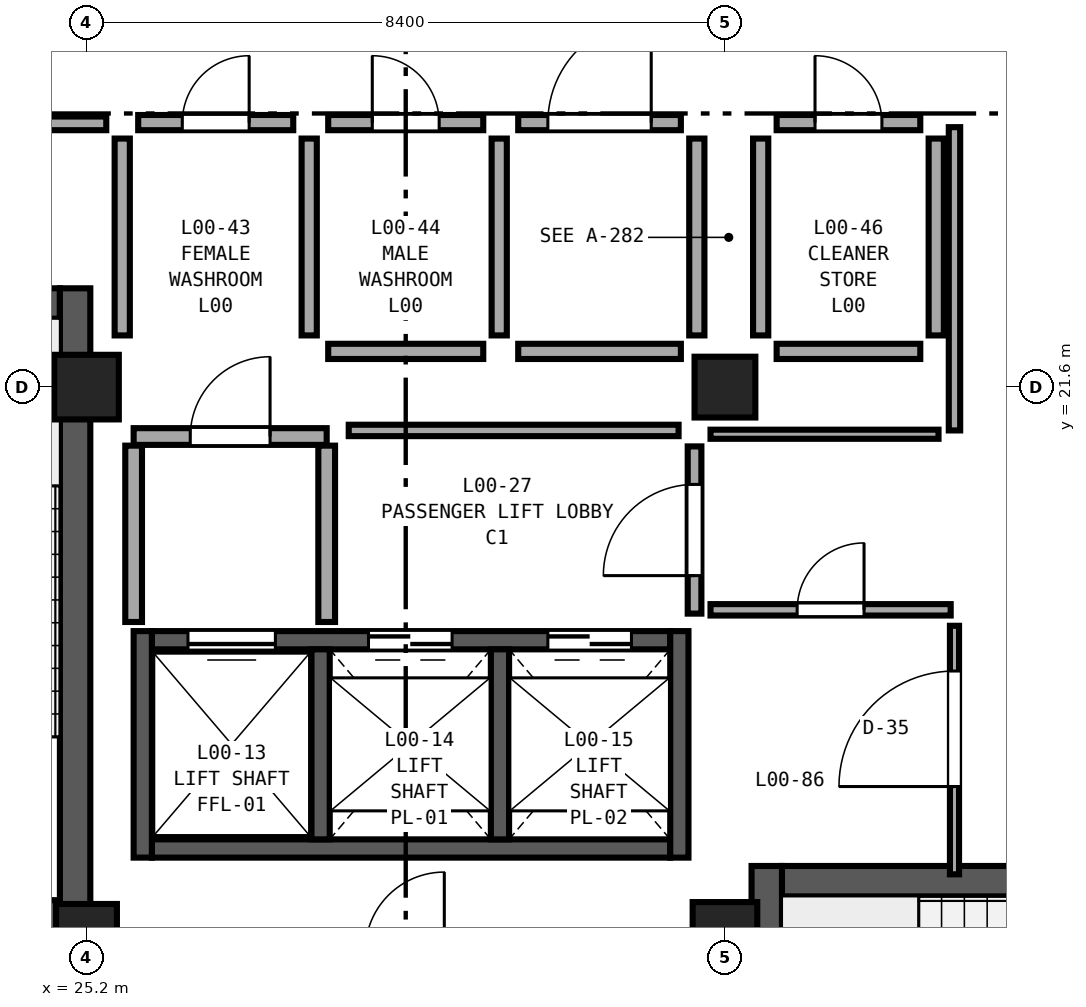
"""IFC4 building model, lengths in metres.
Left out: names, types, materials, properties, quantities, classifications, styles, units other than length and angle.
Written with IfcOpenShell. Run it as: python <this file> out.ifc"""

import sys

from ifc_helpers import new_model, si_unit, direction, frame, frame_2d, origin, origin_2d, place, context, subcontext, project, spatial, rectangle, extrude, element, fill, save


model = new_model("IFC4")
c1 = context("Model", 3, precision=1e-05, world=origin(), true_north=direction((0.0, 1.0)))
c2 = subcontext(c1, "Body", "Model", "MODEL_VIEW")
j1 = project(units=[si_unit("LENGTHUNIT", "METRE"), si_unit("PLANEANGLEUNIT", "RADIAN")], contexts=[c1])
p1 = place(None, origin())
s1 = spatial("IfcSite", under=j1, at=p1, CompositionType="ELEMENT")
p2 = place(p1, origin())
s2 = spatial("IfcBuilding", under=s1, at=p2, CompositionType="ELEMENT")
p3 = place(p2, origin())
s3 = spatial("IfcBuildingStorey", under=s2, at=p3, CompositionType="ELEMENT", Elevation=0.0)
p4 = place(p3, frame((25.2, 14.4, 0.0), z_axis=(0.0, 0.0, 1.0), x_axis=(1.0, 0.0, 0.0)))
e1 = element("IfcColumn", 1, at=p4, inside=s3, PredefinedType="COLUMN", context=c2, shape_type="SweptSolid", body=[
    extrude(rectangle(XDim=0.8, YDim=0.8, at=origin_2d()), origin(), (0.0, 0.0, 1.0), 5.4),
])
for number, where, z_axis, x_axis in (
    (2, (25.2, 21.6, 0.0), (0.0, 0.0, 1.0), (1.0, 0.0, 0.0)),
    (3, (33.6, 14.4, 0.0), (0.0, 0.0, 1.0), (1.0, 0.0, 0.0)),
):
    element("IfcColumn", number, at=place(p3, frame(where, z_axis=z_axis, x_axis=x_axis)), inside=s3, PredefinedType="COLUMN", context=c2, shape_type="SweptSolid", body=[
        extrude(rectangle(XDim=0.85, YDim=0.85, at=origin_2d()), origin(), (0.0, 0.0, 1.0), 5.4),
    ])
p5 = place(p3, frame((33.6, 21.6, 0.0), z_axis=(0.0, 0.0, 1.0), x_axis=(1.0, 0.0, 0.0)))
e4 = element("IfcColumn", 4, at=p5, inside=s3, PredefinedType="COLUMN", context=c2, shape_type="SweptSolid", body=[
    extrude(rectangle(XDim=0.8, YDim=0.8, at=origin_2d()), origin(), (0.0, 0.0, 1.0), 5.4),
])
p6 = place(p3, frame((24.85, 14.65, 0.0), z_axis=(0.0, 0.0, 1.0), x_axis=(-1.0, 0.0, 0.0)))
e5 = element("IfcWall", 5, at=p6, inside=s3, PredefinedType="SHEAR", context=c2, shape_type="SweptSolid", body=[
    extrude(rectangle(XDim=7.7, YDim=0.4, at=frame_2d((3.85, 0.0))), origin(), (0.0, 0.0, 1.0), 5.4),
])
p7 = place(p6, frame((3.3, 0.0, 0.0)))
e6 = element("IfcOpeningElement", 6, at=p7, cuts=e5, PredefinedType="OPENING", context=c2, shape_type="SweptSolid", body=[
    extrude(rectangle(XDim=1.1, YDim=2.2, at=frame_2d((0.55, 1.1))), frame((0.0, 0.22, 0.0), z_axis=(0.0, -1.0, 0.0), x_axis=(1.0, 0.0, 0.0)), (0.0, 0.0, 1.0), 0.44),
])
p8 = place(p3, frame((17.15, 22.7, 0.0), z_axis=(0.0, 0.0, 1.0), x_axis=(1.0, 0.0, 0.0)))
e7 = element("IfcWall", 7, at=p8, inside=s3, PredefinedType="SHEAR", context=c2, shape_type="SweptSolid", body=[
    extrude(rectangle(XDim=7.7, YDim=0.4, at=frame_2d((3.85, 0.0))), origin(), (0.0, 0.0, 1.0), 5.4),
])
p9 = place(p3, frame((25.05, 14.45, 0.0), z_axis=(0.0, 0.0, 1.0), x_axis=(0.0, 1.0, 0.0)))
e8 = element("IfcWall", 8, at=p9, inside=s3, PredefinedType="SHEAR", context=c2, shape_type="SweptSolid", body=[
    extrude(rectangle(XDim=8.45, YDim=0.4, at=frame_2d((4.225, 0.0))), origin(), (0.0, 0.0, 1.0), 5.4),
])
p10 = place(p3, frame((34.35, 15.1, 0.0), z_axis=(0.0, 0.0, 1.0), x_axis=(1.0, 0.0, 0.0)))
e9 = element("IfcWall", 9, at=p10, inside=s3, PredefinedType="SHEAR", context=c2, shape_type="SweptSolid", body=[
    extrude(rectangle(XDim=6.9, YDim=0.4, at=frame_2d((3.45, 0.0))), origin(), (0.0, 0.0, 1.0), 5.4),
])
p11 = place(p3, frame((34.15, 15.3, 0.0), z_axis=(0.0, 0.0, 1.0), x_axis=(0.0, -1.0, 0.0)))
e10 = element("IfcWall", 10, at=p11, inside=s3, PredefinedType="SHEAR", context=c2, shape_type="SweptSolid", body=[
    extrude(rectangle(XDim=8.05, YDim=0.4, at=frame_2d((4.025, 0.0))), origin(), (0.0, 0.0, 1.0), 5.4),
])
p12 = place(p3, frame((32.88, 18.27, 0.0), z_axis=(0.0, 0.0, 1.0), x_axis=(-1.0, 0.0, 0.0)))
e11 = element("IfcWall", 11, at=p12, inside=s3, PredefinedType="SHEAR", context=c2, shape_type="SweptSolid", body=[
    extrude(rectangle(XDim=6.82, YDim=0.24, at=frame_2d((3.41, 0.0))), origin(), (0.0, 0.0, 1.0), 5.08),
])
p13 = place(p12, frame((5.195, 0.0, 0.0)))
e12 = element("IfcOpeningElement", 12, at=p13, cuts=e11, PredefinedType="OPENING", context=c2, shape_type="SweptSolid", body=[
    extrude(rectangle(XDim=1.15, YDim=2.25, at=frame_2d((0.575, 1.125))), frame((0.0, 0.14, 0.0), z_axis=(0.0, -1.0, 0.0), x_axis=(1.0, 0.0, 0.0)), (0.0, 0.0, 1.0), 0.28),
])
p14 = place(p12, frame((2.87, 0.0, 0.0)))
e13 = element("IfcOpeningElement", 13, at=p14, cuts=e11, PredefinedType="OPENING", context=c2, shape_type="SweptSolid", body=[
    extrude(rectangle(XDim=1.1, YDim=2.2, at=frame_2d((0.55, 1.1))), frame((0.0, 0.14, 0.0), z_axis=(0.0, -1.0, 0.0), x_axis=(1.0, 0.0, 0.0)), (0.0, 0.0, 1.0), 0.28),
])
p15 = place(p12, frame((0.51, 0.0, 0.0)))
e14 = element("IfcOpeningElement", 14, at=p15, cuts=e11, PredefinedType="OPENING", context=c2, shape_type="SweptSolid", body=[
    extrude(rectangle(XDim=1.1, YDim=2.2, at=frame_2d((0.55, 1.1))), frame((0.0, 0.14, 0.0), z_axis=(0.0, -1.0, 0.0), x_axis=(1.0, 0.0, 0.0)), (0.0, 0.0, 1.0), 0.28),
])
p16 = place(p3, frame((26.06, 15.53, 0.0), z_axis=(0.0, 0.0, 1.0), x_axis=(1.0, 0.0, 0.0)))
e15 = element("IfcWall", 15, at=p16, inside=s3, PredefinedType="SHEAR", context=c2, shape_type="SweptSolid", body=[
    extrude(rectangle(XDim=6.82, YDim=0.24, at=frame_2d((3.41, 0.0))), origin(), (0.0, 0.0, 1.0), 5.08),
])
for number, where, z_axis, x_axis in (
    (16, (25.94, 18.39, 0.0), (0.0, 0.0, 1.0), (0.0, -1.0, 0.0)),
    (17, (33.0, 15.41, 0.0), (0.0, 0.0, 1.0), (0.0, 1.0, 0.0)),
):
    element("IfcWall", number, at=place(p3, frame(where, z_axis=z_axis, x_axis=x_axis)), inside=s3, PredefinedType="SHEAR", context=c2, shape_type="SweptSolid", body=[
        extrude(rectangle(XDim=2.98, YDim=0.24, at=frame_2d((1.49, 0.0))), origin(), (0.0, 0.0, 1.0), 5.08),
    ])
for number, where, z_axis, x_axis in (
    (18, (28.28, 15.65, 0.0), (0.0, 0.0, 1.0), (0.0, 1.0, 0.0)),
    (19, (30.64, 15.65, 0.0), (0.0, 0.0, 1.0), (0.0, 1.0, 0.0)),
):
    element("IfcWall", number, at=place(p3, frame(where, z_axis=z_axis, x_axis=x_axis)), inside=s3, PredefinedType="SHEAR", context=c2, shape_type="SweptSolid", body=[
        extrude(rectangle(XDim=2.5, YDim=0.24, at=frame_2d((1.25, 0.0))), origin(), (0.0, 0.0, 1.0), 5.08),
    ])
p17 = place(p3, frame((25.82, 20.95, 0.0), z_axis=(0.0, 0.0, 1.0), x_axis=(1.0, 0.0, 0.0)))
e20 = element("IfcWall", 20, at=p17, inside=s3, PredefinedType="SOLIDWALL", context=c2, shape_type="SweptSolid", body=[
    extrude(rectangle(XDim=2.54, YDim=0.22, at=frame_2d((1.27, 0.0))), origin(), (0.0, 0.0, 1.0), 4.58),
])
p18 = place(p17, frame((0.745, 0.0, 0.0)))
e21 = element("IfcOpeningElement", 21, at=p18, cuts=e20, PredefinedType="OPENING", context=c2, shape_type="SweptSolid", body=[
    extrude(rectangle(XDim=1.05, YDim=2.15, at=frame_2d((0.525, 1.075))), frame((0.0, 0.13, 0.0), z_axis=(0.0, -1.0, 0.0), x_axis=(1.0, 0.0, 0.0)), (0.0, 0.0, 1.0), 0.26),
])
for number, where, z_axis, x_axis in (
    (22, (25.82, 18.51, 0.0), (0.0, 0.0, 1.0), (0.0, 1.0, 0.0)),
    (23, (28.36, 18.51, 0.0), (0.0, 0.0, 1.0), (0.0, 1.0, 0.0)),
):
    element("IfcWall", number, at=place(p3, frame(where, z_axis=z_axis, x_axis=x_axis)), inside=s3, PredefinedType="SOLIDWALL", context=c2, shape_type="SweptSolid", body=[
        extrude(rectangle(XDim=2.32, YDim=0.22, at=frame_2d((1.16, 0.0))), origin(), (0.0, 0.0, 1.0), 5.08),
    ])
p19 = place(p3, frame((28.65, 21.03, 0.0), z_axis=(0.0, 0.0, 1.0), x_axis=(1.0, 0.0, 0.0)))
e24 = element("IfcWall", 24, at=p19, inside=s3, PredefinedType="PARTITIONING", context=c2, shape_type="SweptSolid", body=[
    extrude(rectangle(XDim=4.34, YDim=0.15, at=frame_2d((2.17, 0.0))), origin(), (0.0, 0.0, 1.0), 4.58),
])
p20 = place(p3, frame((36.62, 21.03, 0.0), z_axis=(0.0, 0.0, 1.0), x_axis=(0.0, 1.0, 0.0)))
e25 = element("IfcWall", 25, at=p20, inside=s3, PredefinedType="PARTITIONING", context=c2, shape_type="SweptSolid", body=[
    extrude(rectangle(XDim=3.99, YDim=0.15, at=frame_2d((1.995, 0.0))), origin(), (0.0, 0.0, 1.0), 5.08),
])
p21 = place(p3, frame((36.62, 15.19, 0.0), z_axis=(0.0, 0.0, 1.0), x_axis=(0.0, 1.0, 0.0)))
e26 = element("IfcWall", 26, at=p21, inside=s3, PredefinedType="PARTITIONING", context=c2, shape_type="SweptSolid", body=[
    extrude(rectangle(XDim=3.27, YDim=0.12, at=frame_2d((1.635, 0.0))), origin(), (0.0, 0.0, 1.0), 5.08),
])
p22 = place(p21, frame((1.155, 0.0, 0.0)))
e27 = element("IfcOpeningElement", 27, at=p22, cuts=e26, PredefinedType="OPENING", context=c2, shape_type="SweptSolid", body=[
    extrude(rectangle(XDim=1.52, YDim=2.45, at=frame_2d((0.76, 1.225))), frame((0.0, 0.08, 0.0), z_axis=(0.0, -1.0, 0.0), x_axis=(1.0, 0.0, 0.0)), (0.0, 0.0, 1.0), 0.16),
])
p23 = place(p3, frame((22.24, 25.07, 0.0), z_axis=(0.0, 0.0, 1.0), x_axis=(1.0, 0.0, 0.0)))
e28 = element("IfcWall", 28, at=p23, inside=s3, PredefinedType="PARTITIONING", context=c2, shape_type="SweptSolid", body=[
    extrude(rectangle(XDim=3.22, YDim=0.18, at=frame_2d((1.61, 0.0))), origin(), (0.0, 0.0, 1.0), 5.08),
])
p24 = place(p23, frame((0.77, 0.0, 0.0)))
e29 = element("IfcOpeningElement", 29, at=p24, cuts=e28, PredefinedType="OPENING", context=c2, shape_type="SweptSolid", body=[
    extrude(rectangle(XDim=1.68, YDim=2.45, at=frame_2d((0.84, 1.225))), frame((0.0, 0.11, 0.0), z_axis=(0.0, -1.0, 0.0), x_axis=(1.0, 0.0, 0.0)), (0.0, 0.0, 1.0), 0.22),
])
p25 = place(p3, frame((33.41, 18.67, 0.0), z_axis=(0.0, 0.0, 1.0), x_axis=(1.0, 0.0, 0.0)))
e30 = element("IfcWall", 30, at=p25, inside=s3, PredefinedType="PARTITIONING", context=c2, shape_type="SweptSolid", body=[
    extrude(rectangle(XDim=3.16, YDim=0.15, at=frame_2d((1.58, 0.0))), origin(), (0.0, 0.0, 1.0), 5.08),
])
p26 = place(p25, frame((1.14, 0.0, 0.0)))
e31 = element("IfcOpeningElement", 31, at=p26, cuts=e30, PredefinedType="OPENING", context=c2, shape_type="SweptSolid", body=[
    extrude(rectangle(XDim=0.88, YDim=2.05, at=frame_2d((0.44, 1.025))), frame((0.0, 0.095, 0.0), z_axis=(0.0, -1.0, 0.0), x_axis=(1.0, 0.0, 0.0)), (0.0, 0.0, 1.0), 0.19),
])
p27 = place(p3, frame((33.41, 20.98, 0.0), z_axis=(0.0, 0.0, 1.0), x_axis=(1.0, 0.0, 0.0)))
e32 = element("IfcWall", 32, at=p27, inside=s3, PredefinedType="PARTITIONING", context=c2, shape_type="SweptSolid", body=[
    extrude(rectangle(XDim=3.0, YDim=0.12, at=frame_2d((1.5, 0.0))), origin(), (0.0, 0.0, 1.0), 4.58),
])
p28 = place(p3, frame((33.2, 18.62, 0.0), z_axis=(0.0, 0.0, 1.0), x_axis=(0.0, 1.0, 0.0)))
e33 = element("IfcWall", 33, at=p28, inside=s3, PredefinedType="PARTITIONING", context=c2, shape_type="SweptSolid", body=[
    extrude(rectangle(XDim=2.2, YDim=0.18, at=frame_2d((1.1, 0.0))), origin(), (0.0, 0.0, 1.0), 4.58),
])
p29 = place(p28, frame((0.5, 0.0, 0.0)))
e34 = element("IfcOpeningElement", 34, at=p29, cuts=e33, PredefinedType="OPENING", context=c2, shape_type="SweptSolid", body=[
    extrude(rectangle(XDim=1.2, YDim=2.29, at=frame_2d((0.6, 1.145))), frame((0.0, 0.11, 0.0), z_axis=(0.0, -1.0, 0.0), x_axis=(1.0, 0.0, 0.0)), (0.0, 0.0, 1.0), 0.22),
])
p30 = place(p3, frame((30.88, 25.08, 0.0), z_axis=(0.0, 0.0, 1.0), x_axis=(1.0, 0.0, 0.0)))
e35 = element("IfcWall", 35, at=p30, inside=s3, PredefinedType="PLUMBINGWALL", context=c2, shape_type="SweptSolid", body=[
    extrude(rectangle(XDim=2.14, YDim=0.2, at=frame_2d((1.07, 0.0))), origin(), (0.0, 0.0, 1.0), 5.08),
])
p31 = place(p30, frame((0.39, 0.0, 0.0)))
e36 = element("IfcOpeningElement", 36, at=p31, cuts=e35, PredefinedType="OPENING", context=c2, shape_type="SweptSolid", body=[
    extrude(rectangle(XDim=1.36, YDim=2.29, at=frame_2d((0.68, 1.145))), frame((0.0, 0.12, 0.0), z_axis=(0.0, -1.0, 0.0), x_axis=(1.0, 0.0, 0.0)), (0.0, 0.0, 1.0), 0.24),
])
p32 = place(p3, frame((25.88, 25.08, 0.0), z_axis=(0.0, 0.0, 1.0), x_axis=(1.0, 0.0, 0.0)))
e37 = element("IfcWall", 37, at=p32, inside=s3, PredefinedType="PLUMBINGWALL", context=c2, shape_type="SweptSolid", body=[
    extrude(rectangle(XDim=2.04, YDim=0.2, at=frame_2d((1.02, 0.0))), origin(), (0.0, 0.0, 1.0), 5.08),
])
p33 = place(p32, frame((0.58, 0.0, 0.0)))
e38 = element("IfcOpeningElement", 38, at=p33, cuts=e37, PredefinedType="OPENING", context=c2, shape_type="SweptSolid", body=[
    extrude(rectangle(XDim=0.88, YDim=2.05, at=frame_2d((0.44, 1.025))), frame((0.0, 0.12, 0.0), z_axis=(0.0, -1.0, 0.0), x_axis=(1.0, 0.0, 0.0)), (0.0, 0.0, 1.0), 0.24),
])
p34 = place(p3, frame((28.38, 25.08, 0.0), z_axis=(0.0, 0.0, 1.0), x_axis=(1.0, 0.0, 0.0)))
e39 = element("IfcWall", 39, at=p34, inside=s3, PredefinedType="PLUMBINGWALL", context=c2, shape_type="SweptSolid", body=[
    extrude(rectangle(XDim=2.04, YDim=0.2, at=frame_2d((1.02, 0.0))), origin(), (0.0, 0.0, 1.0), 5.08),
])
p35 = place(p34, frame((0.58, 0.0, 0.0)))
e40 = element("IfcOpeningElement", 40, at=p35, cuts=e39, PredefinedType="OPENING", context=c2, shape_type="SweptSolid", body=[
    extrude(rectangle(XDim=0.88, YDim=2.37, at=frame_2d((0.44, 1.185))), frame((0.0, 0.12, 0.0), z_axis=(0.0, -1.0, 0.0), x_axis=(1.0, 0.0, 0.0)), (0.0, 0.0, 1.0), 0.24),
])
p36 = place(p3, frame((34.28, 25.08, 0.0), z_axis=(0.0, 0.0, 1.0), x_axis=(1.0, 0.0, 0.0)))
e41 = element("IfcWall", 41, at=p36, inside=s3, PredefinedType="PLUMBINGWALL", context=c2, shape_type="SweptSolid", body=[
    extrude(rectangle(XDim=1.89, YDim=0.2, at=frame_2d((0.945, 0.0))), origin(), (0.0, 0.0, 1.0), 5.08),
])
p37 = place(p36, frame((0.505, 0.0, 0.0)))
e42 = element("IfcOpeningElement", 42, at=p37, cuts=e41, PredefinedType="OPENING", context=c2, shape_type="SweptSolid", body=[
    extrude(rectangle(XDim=0.88, YDim=2.05, at=frame_2d((0.44, 1.025))), frame((0.0, 0.12, 0.0), z_axis=(0.0, -1.0, 0.0), x_axis=(1.0, 0.0, 0.0)), (0.0, 0.0, 1.0), 0.24),
])
for number, where, z_axis, x_axis in (
    (43, (28.13, 22.28, 0.0), (0.0, 0.0, 1.0), (0.0, 1.0, 0.0)),
    (44, (25.67, 22.28, 0.0), (0.0, 0.0, 1.0), (0.0, 1.0, 0.0)),
    (45, (30.63, 22.28, 0.0), (0.0, 0.0, 1.0), (0.0, 1.0, 0.0)),
):
    element("IfcWall", number, at=place(p3, frame(where, z_axis=z_axis, x_axis=x_axis)), inside=s3, PredefinedType="PLUMBINGWALL", context=c2, shape_type="SweptSolid", body=[
        extrude(rectangle(XDim=2.59, YDim=0.2, at=frame_2d((1.295, 0.0))), origin(), (0.0, 0.0, 1.0), 5.08),
    ])
p38 = place(p3, frame((33.23, 22.28, 0.0), z_axis=(0.0, 0.0, 1.0), x_axis=(0.0, 1.0, 0.0)))
e46 = element("IfcWall", 46, at=p38, inside=s3, PredefinedType="PLUMBINGWALL", context=c2, shape_type="SweptSolid", body=[
    extrude(rectangle(XDim=2.59, YDim=0.2, at=frame_2d((1.295, 0.0))), origin(), (0.0, 0.0, 1.0), 4.58),
])
p39 = place(p3, frame((36.38, 22.28, 0.0), z_axis=(0.0, 0.0, 1.0), x_axis=(0.0, 1.0, 0.0)))
e47 = element("IfcWall", 47, at=p39, inside=s3, PredefinedType="PLUMBINGWALL", context=c2, shape_type="SweptSolid", body=[
    extrude(rectangle(XDim=2.59, YDim=0.2, at=frame_2d((1.295, 0.0))), origin(), (0.0, 0.0, 1.0), 5.08),
])
p40 = place(p3, frame((34.07, 22.28, 0.0), z_axis=(0.0, 0.0, 1.0), x_axis=(0.0, 1.0, 0.0)))
e48 = element("IfcWall", 48, at=p40, inside=s3, PredefinedType="PLUMBINGWALL", context=c2, shape_type="SweptSolid", body=[
    extrude(rectangle(XDim=2.59, YDim=0.2, at=frame_2d((1.295, 0.0))), origin(), (0.0, 0.0, 1.0), 4.58),
])
p41 = place(p3, frame((30.88, 22.07, 0.0), z_axis=(0.0, 0.0, 1.0), x_axis=(1.0, 0.0, 0.0)))
e49 = element("IfcWall", 49, at=p41, inside=s3, PredefinedType="PLUMBINGWALL", context=c2, shape_type="SweptSolid", body=[
    extrude(rectangle(XDim=2.14, YDim=0.2, at=frame_2d((1.07, 0.0))), origin(), (0.0, 0.0, 1.0), 4.58),
])
p42 = place(p3, frame((28.38, 22.07, 0.0), z_axis=(0.0, 0.0, 1.0), x_axis=(1.0, 0.0, 0.0)))
e50 = element("IfcWall", 50, at=p42, inside=s3, PredefinedType="PLUMBINGWALL", context=c2, shape_type="SweptSolid", body=[
    extrude(rectangle(XDim=2.04, YDim=0.2, at=frame_2d((1.02, 0.0))), origin(), (0.0, 0.0, 1.0), 4.58),
])
p43 = place(p3, frame((34.28, 22.07, 0.0), z_axis=(0.0, 0.0, 1.0), x_axis=(1.0, 0.0, 0.0)))
e51 = element("IfcWall", 51, at=p43, inside=s3, PredefinedType="PLUMBINGWALL", context=c2, shape_type="SweptSolid", body=[
    extrude(rectangle(XDim=1.89, YDim=0.2, at=frame_2d((0.945, 0.0))), origin(), (0.0, 0.0, 1.0), 4.58),
])
p44 = place(p13, origin())
e52 = element("IfcDoor", 52, at=p44, inside=s3, OperationType="SLIDING_TO_LEFT", PredefinedType="DOOR", context=c2, shape_type="SweptSolid", body=[
    extrude(rectangle(XDim=1.15, YDim=2.25, at=frame_2d((0.575, 1.125))), frame((0.0, 0.025, 0.0), z_axis=(0.0, -1.0, 0.0), x_axis=(1.0, 0.0, 0.0)), (0.0, 0.0, 1.0), 0.05),
])
fill(e12, e52)
p45 = place(p14, origin())
e53 = element("IfcDoor", 53, at=p45, inside=s3, OperationType="DOUBLE_DOOR_SLIDING", PredefinedType="DOOR", context=c2, shape_type="SweptSolid", body=[
    extrude(rectangle(XDim=1.1, YDim=2.2, at=frame_2d((0.55, 1.1))), frame((0.0, 0.025, 0.0), z_axis=(0.0, -1.0, 0.0), x_axis=(1.0, 0.0, 0.0)), (0.0, 0.0, 1.0), 0.05),
])
fill(e13, e53)
p46 = place(p15, origin())
e54 = element("IfcDoor", 54, at=p46, inside=s3, OperationType="DOUBLE_DOOR_SLIDING", PredefinedType="DOOR", context=c2, shape_type="SweptSolid", body=[
    extrude(rectangle(XDim=1.1, YDim=2.2, at=frame_2d((0.55, 1.1))), frame((0.0, 0.025, 0.0), z_axis=(0.0, -1.0, 0.0), x_axis=(1.0, 0.0, 0.0)), (0.0, 0.0, 1.0), 0.05),
])
fill(e14, e54)
p47 = place(p18, origin())
e55 = element("IfcDoor", 55, at=p47, inside=s3, OperationType="SINGLE_SWING_RIGHT", PredefinedType="DOOR", context=c2, shape_type="SweptSolid", body=[
    extrude(rectangle(XDim=1.05, YDim=2.15, at=frame_2d((0.525, 1.075))), frame((0.0, 0.025, 0.0), z_axis=(0.0, -1.0, 0.0), x_axis=(1.0, 0.0, 0.0)), (0.0, 0.0, 1.0), 0.05),
])
fill(e21, e55)
p48 = place(p22, origin())
e56 = element("IfcDoor", 56, at=p48, inside=s3, OperationType="SINGLE_SWING_LEFT", PredefinedType="DOOR", context=c2, shape_type="SweptSolid", body=[
    extrude(rectangle(XDim=1.52, YDim=2.45, at=frame_2d((0.76, 1.225))), frame((0.0, 0.025, 0.0), z_axis=(0.0, -1.0, 0.0), x_axis=(1.0, 0.0, 0.0)), (0.0, 0.0, 1.0), 0.05),
])
fill(e27, e56)
p49 = place(p26, frame((0.88, 0.0, 0.0), z_axis=(0.0, 0.0, 1.0), x_axis=(-1.0, 0.0, 0.0)))
e57 = element("IfcDoor", 57, at=p49, inside=s3, OperationType="SINGLE_SWING_RIGHT", PredefinedType="DOOR", context=c2, shape_type="SweptSolid", body=[
    extrude(rectangle(XDim=0.88, YDim=2.05, at=frame_2d((0.44, 1.025))), frame((0.0, 0.025, 0.0), z_axis=(0.0, -1.0, 0.0), x_axis=(1.0, 0.0, 0.0)), (0.0, 0.0, 1.0), 0.05),
])
fill(e31, e57)
p50 = place(p29, origin())
e58 = element("IfcDoor", 58, at=p50, inside=s3, OperationType="SINGLE_SWING_LEFT", PredefinedType="DOOR", context=c2, shape_type="SweptSolid", body=[
    extrude(rectangle(XDim=1.2, YDim=2.29, at=frame_2d((0.6, 1.145))), frame((0.0, 0.025, 0.0), z_axis=(0.0, -1.0, 0.0), x_axis=(1.0, 0.0, 0.0)), (0.0, 0.0, 1.0), 0.05),
])
fill(e34, e58)
p51 = place(p31, frame((1.36, 0.0, 0.0), z_axis=(0.0, 0.0, 1.0), x_axis=(-1.0, 0.0, 0.0)))
e59 = element("IfcDoor", 59, at=p51, inside=s3, OperationType="SINGLE_SWING_RIGHT", PredefinedType="DOOR", context=c2, shape_type="SweptSolid", body=[
    extrude(rectangle(XDim=1.36, YDim=2.29, at=frame_2d((0.68, 1.145))), frame((0.0, 0.025, 0.0), z_axis=(0.0, -1.0, 0.0), x_axis=(1.0, 0.0, 0.0)), (0.0, 0.0, 1.0), 0.05),
])
fill(e36, e59)
p52 = place(p33, frame((0.88, 0.0, 0.0), z_axis=(0.0, 0.0, 1.0), x_axis=(-1.0, 0.0, 0.0)))
e60 = element("IfcDoor", 60, at=p52, inside=s3, OperationType="SINGLE_SWING_RIGHT", PredefinedType="DOOR", context=c2, shape_type="SweptSolid", body=[
    extrude(rectangle(XDim=0.88, YDim=2.05, at=frame_2d((0.44, 1.025))), frame((0.0, 0.025, 0.0), z_axis=(0.0, -1.0, 0.0), x_axis=(1.0, 0.0, 0.0)), (0.0, 0.0, 1.0), 0.05),
])
fill(e38, e60)
p53 = place(p35, frame((0.88, 0.0, 0.0), z_axis=(0.0, 0.0, 1.0), x_axis=(-1.0, 0.0, 0.0)))
e61 = element("IfcDoor", 61, at=p53, inside=s3, OperationType="SINGLE_SWING_LEFT", PredefinedType="DOOR", context=c2, shape_type="SweptSolid", body=[
    extrude(rectangle(XDim=0.88, YDim=2.37, at=frame_2d((0.44, 1.185))), frame((0.0, 0.025, 0.0), z_axis=(0.0, -1.0, 0.0), x_axis=(1.0, 0.0, 0.0)), (0.0, 0.0, 1.0), 0.05),
])
fill(e40, e61)
p54 = place(p37, frame((0.88, 0.0, 0.0), z_axis=(0.0, 0.0, 1.0), x_axis=(-1.0, 0.0, 0.0)))
e62 = element("IfcDoor", 62, at=p54, inside=s3, OperationType="SINGLE_SWING_LEFT", PredefinedType="DOOR", context=c2, shape_type="SweptSolid", body=[
    extrude(rectangle(XDim=0.88, YDim=2.05, at=frame_2d((0.44, 1.025))), frame((0.0, 0.025, 0.0), z_axis=(0.0, -1.0, 0.0), x_axis=(1.0, 0.0, 0.0)), (0.0, 0.0, 1.0), 0.05),
])
fill(e42, e62)
save(model, sys.argv[1])
